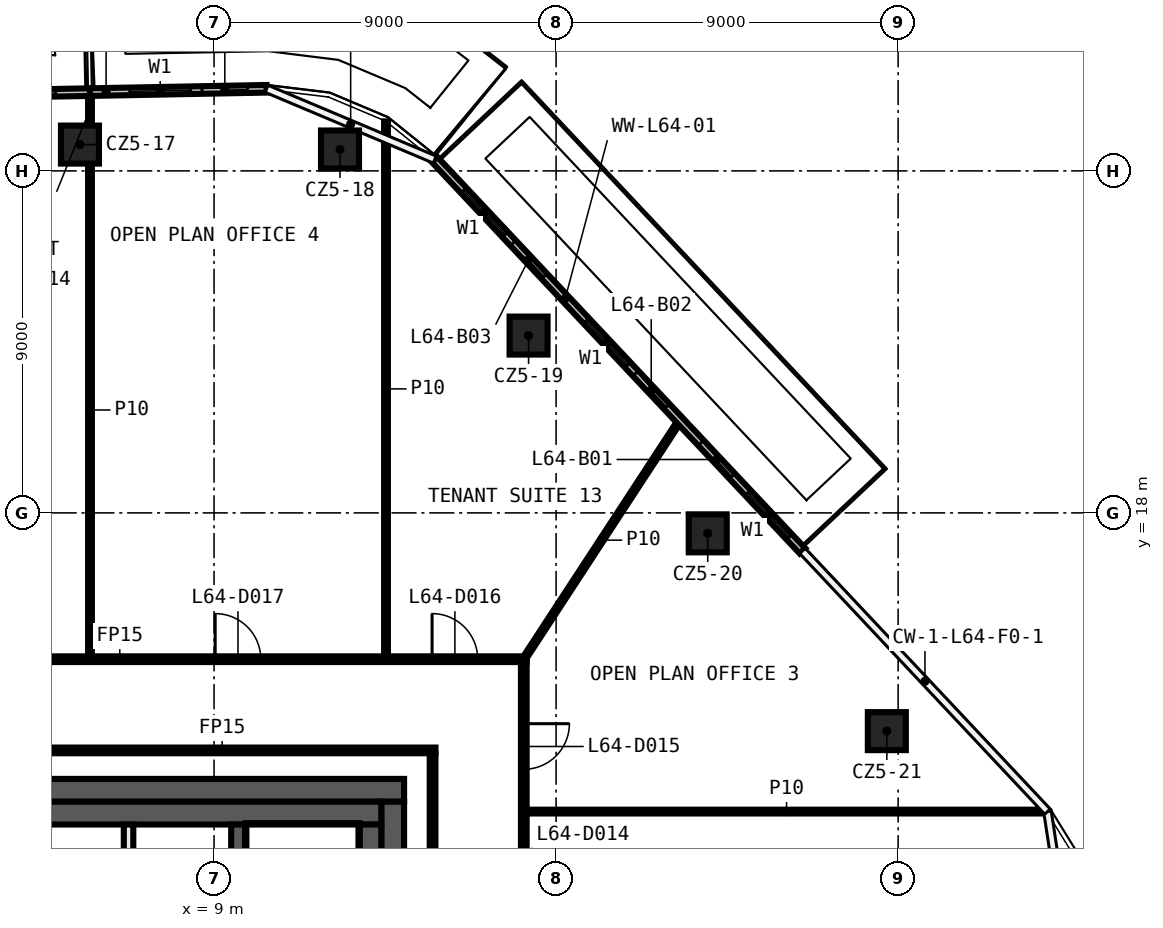
"""IFC4 building model, lengths in metres.
Left out: names, types, materials, properties, quantities, classifications, styles, units other than length and angle.
Written with IfcOpenShell. Run it as: python <this file> out.ifc"""

import sys

from ifc_helpers import new_model, si_unit, direction, frame, frame_2d, origin, origin_2d, place, context, subcontext, project, spatial, rectangle, extrude, element, fill, save


model = new_model("IFC4")
c1 = context("Model", 3, precision=1e-05, world=origin(), true_north=direction((0.0, 1.0)))
c2 = subcontext(c1, "Body", "Model", "MODEL_VIEW")
j1 = project(units=[si_unit("LENGTHUNIT", "METRE"), si_unit("PLANEANGLEUNIT", "RADIAN")], contexts=[c1])
p1 = place(None, origin())
s1 = spatial("IfcSite", under=j1, at=p1, CompositionType="ELEMENT")
p2 = place(p1, origin())
s2 = spatial("IfcBuilding", under=s1, at=p2, CompositionType="ELEMENT")
p3 = place(p2, frame((0.0, 0.0, 302.6)))
s3 = spatial("IfcBuildingStorey", under=s2, at=p3, CompositionType="ELEMENT", Elevation=302.6)
for number, where, z_axis, x_axis in (
    (1, (5.471, 27.692, 0.0), (0.0, 0.0, 1.0), (1.0, 0.0, 0.0)),
    (2, (12.314, 27.563, 0.0), (0.0, 0.0, 1.0), (1.0, 0.0, 0.0)),
    (3, (17.276, 22.666, 0.0), (0.0, 0.0, 1.0), (1.0, 0.0, 0.0)),
    (4, (21.99, 17.462, 0.0), (0.0, 0.0, 1.0), (1.0, 0.0, 0.0)),
    (5, (26.703, 12.257, 0.0), (0.0, 0.0, 1.0), (1.0, 0.0, 0.0)),
):
    element("IfcColumn", number, at=place(p3, frame(where, z_axis=z_axis, x_axis=x_axis)), inside=s3, PredefinedType="COLUMN", context=c2, shape_type="SweptSolid", body=[
        extrude(rectangle(XDim=1.0, YDim=1.0, at=origin_2d()), origin(), (0.0, 0.0, 1.0), 3.82),
    ])
p4 = place(p3, frame((17.225, 10.14, 0.0), z_axis=(0.0, 0.0, 1.0), x_axis=(1.0, 0.0, 0.0)))
e6 = element("IfcWall", 6, at=p4, inside=s3, PredefinedType="PARTITIONING", context=c2, shape_type="SweptSolid", body=[
    extrude(rectangle(XDim=13.677, YDim=0.1, at=frame_2d((6.839, 0.0))), origin(), (0.0, 0.0, 1.0), 3.82),
])
p5 = place(p3, frame((3.6, 11.75, 0.0), z_axis=(0.0, 0.0, 1.0), x_axis=(1.0, 0.0, 0.0)))
e7 = element("IfcWall", 7, at=p5, inside=s3, PredefinedType="PARTITIONING", context=c2, shape_type="SweptSolid", body=[
    extrude(rectangle(XDim=11.225, YDim=0.15, at=frame_2d((5.612, 0.0))), origin(), (0.0, 0.0, 1.0), 3.82),
])
p6 = place(p3, frame((-17.225, 14.15, 0.0), z_axis=(0.0, 0.0, 1.0), x_axis=(1.0, 0.0, 0.0)))
e8 = element("IfcWall", 8, at=p6, inside=s3, PredefinedType="PARTITIONING", context=c2, shape_type="SweptSolid", body=[
    extrude(rectangle(XDim=34.45, YDim=0.15, at=frame_2d((17.225, 0.0))), origin(), (0.0, 0.0, 1.0), 3.82),
])
p7 = place(p6, frame((31.962, 0.0, 0.0)))
e9 = element("IfcOpeningElement", 9, at=p7, cuts=e8, PredefinedType="OPENING", context=c2, shape_type="SweptSolid", body=[
    extrude(rectangle(XDim=1.2, YDim=2.1, at=frame_2d((0.6, 1.05))), frame((0.0, 0.085, 0.0), z_axis=(0.0, -1.0, 0.0), x_axis=(1.0, 0.0, 0.0)), (0.0, 0.0, 1.0), 0.17),
])
p8 = place(p6, frame((26.254, 0.0, 0.0)))
e10 = element("IfcOpeningElement", 10, at=p8, cuts=e8, PredefinedType="OPENING", context=c2, shape_type="SweptSolid", body=[
    extrude(rectangle(XDim=1.2, YDim=2.1, at=frame_2d((0.6, 1.05))), frame((0.0, 0.085, 0.0), z_axis=(0.0, -1.0, 0.0), x_axis=(1.0, 0.0, 0.0)), (0.0, 0.0, 1.0), 0.17),
])
p9 = place(p6, frame((20.032, 0.0, 0.0)))
e11 = element("IfcOpeningElement", 11, at=p9, cuts=e8, PredefinedType="OPENING", context=c2, shape_type="SweptSolid", body=[
    extrude(rectangle(XDim=1.2, YDim=2.1, at=frame_2d((0.6, 1.05))), frame((0.0, 0.085, 0.0), z_axis=(0.0, -1.0, 0.0), x_axis=(1.0, 0.0, 0.0)), (0.0, 0.0, 1.0), 0.17),
])
p10 = place(p6, frame((15.378, 0.0, 0.0)))
e12 = element("IfcOpeningElement", 12, at=p10, cuts=e8, PredefinedType="OPENING", context=c2, shape_type="SweptSolid", body=[
    extrude(rectangle(XDim=1.2, YDim=2.1, at=frame_2d((0.6, 1.05))), frame((0.0, 0.085, 0.0), z_axis=(0.0, -1.0, 0.0), x_axis=(1.0, 0.0, 0.0)), (0.0, 0.0, 1.0), 0.17),
])
p11 = place(p6, frame((10.723, 0.0, 0.0)))
e13 = element("IfcOpeningElement", 13, at=p11, cuts=e8, PredefinedType="OPENING", context=c2, shape_type="SweptSolid", body=[
    extrude(rectangle(XDim=1.2, YDim=2.1, at=frame_2d((0.6, 1.05))), frame((0.0, 0.085, 0.0), z_axis=(0.0, -1.0, 0.0), x_axis=(1.0, 0.0, 0.0)), (0.0, 0.0, 1.0), 0.17),
])
p12 = place(p6, frame((6.073, 0.0, 0.0)))
e14 = element("IfcOpeningElement", 14, at=p12, cuts=e8, PredefinedType="OPENING", context=c2, shape_type="SweptSolid", body=[
    extrude(rectangle(XDim=1.2, YDim=2.1, at=frame_2d((0.6, 1.05))), frame((0.0, 0.085, 0.0), z_axis=(0.0, -1.0, 0.0), x_axis=(1.0, 0.0, 0.0)), (0.0, 0.0, 1.0), 0.17),
])
p13 = place(p6, frame((1.774, 0.0, 0.0)))
e15 = element("IfcOpeningElement", 15, at=p13, cuts=e8, PredefinedType="OPENING", context=c2, shape_type="SweptSolid", body=[
    extrude(rectangle(XDim=1.2, YDim=2.1, at=frame_2d((0.6, 1.05))), frame((0.0, 0.085, 0.0), z_axis=(0.0, -1.0, 0.0), x_axis=(1.0, 0.0, 0.0)), (0.0, 0.0, 1.0), 0.17),
])
p14 = place(p3, frame((17.15, 14.15, 0.0), z_axis=(0.0, 0.0, 1.0), x_axis=(0.547120172247, 0.837054070608, 0.0)))
e16 = element("IfcWall", 16, at=p14, inside=s3, PredefinedType="PARTITIONING", context=c2, shape_type="SweptSolid", body=[
    extrude(rectangle(XDim=7.485, YDim=0.1, at=frame_2d((3.743, 0.0))), origin(), (0.0, 0.0, 1.0), 3.82),
])
p15 = place(p3, frame((17.15, 14.075, 0.0), z_axis=(0.0, 0.0, 1.0), x_axis=(0.0, -1.0, 0.0)))
e17 = element("IfcWall", 17, at=p15, inside=s3, PredefinedType="PARTITIONING", context=c2, shape_type="SweptSolid", body=[
    extrude(rectangle(XDim=28.15, YDim=0.15, at=frame_2d((14.075, 0.0))), origin(), (0.0, 0.0, 1.0), 3.82),
])
p16 = place(p15, frame((24.326, 0.0, 0.0)))
e18 = element("IfcOpeningElement", 18, at=p16, cuts=e17, PredefinedType="OPENING", context=c2, shape_type="SweptSolid", body=[
    extrude(rectangle(XDim=1.2, YDim=2.1, at=frame_2d((0.6, 1.05))), frame((0.0, 0.085, 0.0), z_axis=(0.0, -1.0, 0.0), x_axis=(1.0, 0.0, 0.0)), (0.0, 0.0, 1.0), 0.17),
])
p17 = place(p15, frame((20.22, 0.0, 0.0)))
e19 = element("IfcOpeningElement", 19, at=p17, cuts=e17, PredefinedType="OPENING", context=c2, shape_type="SweptSolid", body=[
    extrude(rectangle(XDim=1.2, YDim=2.1, at=frame_2d((0.6, 1.05))), frame((0.0, 0.085, 0.0), z_axis=(0.0, -1.0, 0.0), x_axis=(1.0, 0.0, 0.0)), (0.0, 0.0, 1.0), 0.17),
])
p18 = place(p15, frame((16.114, 0.0, 0.0)))
e20 = element("IfcOpeningElement", 20, at=p18, cuts=e17, PredefinedType="OPENING", context=c2, shape_type="SweptSolid", body=[
    extrude(rectangle(XDim=1.2, YDim=2.1, at=frame_2d((0.6, 1.05))), frame((0.0, 0.085, 0.0), z_axis=(0.0, -1.0, 0.0), x_axis=(1.0, 0.0, 0.0)), (0.0, 0.0, 1.0), 0.17),
])
p19 = place(p15, frame((12.012, 0.0, 0.0)))
e21 = element("IfcOpeningElement", 21, at=p19, cuts=e17, PredefinedType="OPENING", context=c2, shape_type="SweptSolid", body=[
    extrude(rectangle(XDim=1.2, YDim=2.1, at=frame_2d((0.6, 1.05))), frame((0.0, 0.085, 0.0), z_axis=(0.0, -1.0, 0.0), x_axis=(1.0, 0.0, 0.0)), (0.0, 0.0, 1.0), 0.17),
])
p20 = place(p15, frame((5.504, 0.0, 0.0)))
e22 = element("IfcOpeningElement", 22, at=p20, cuts=e17, PredefinedType="OPENING", context=c2, shape_type="SweptSolid", body=[
    extrude(rectangle(XDim=1.2, YDim=2.1, at=frame_2d((0.6, 1.05))), frame((0.0, 0.085, 0.0), z_axis=(0.0, -1.0, 0.0), x_axis=(1.0, 0.0, 0.0)), (0.0, 0.0, 1.0), 0.17),
])
p21 = place(p15, frame((1.622, 0.0, 0.0)))
e23 = element("IfcOpeningElement", 23, at=p21, cuts=e17, PredefinedType="OPENING", context=c2, shape_type="SweptSolid", body=[
    extrude(rectangle(XDim=1.2, YDim=2.1, at=frame_2d((0.6, 1.05))), frame((0.0, 0.085, 0.0), z_axis=(0.0, -1.0, 0.0), x_axis=(1.0, 0.0, 0.0)), (0.0, 0.0, 1.0), 0.17),
])
p22 = place(p3, frame((14.75, -11.675, 0.0), z_axis=(0.0, 0.0, 1.0), x_axis=(0.0, 1.0, 0.0)))
e24 = element("IfcWall", 24, at=p22, inside=s3, PredefinedType="PARTITIONING", context=c2, shape_type="SweptSolid", body=[
    extrude(rectangle(XDim=23.35, YDim=0.15, at=frame_2d((11.675, 0.0))), origin(), (0.0, 0.0, 1.0), 3.82),
])
p23 = place(p3, frame((13.524, 14.225, 0.0), z_axis=(0.0, 0.0, 1.0), x_axis=(0.0, 1.0, 0.0)))
e25 = element("IfcWall", 25, at=p23, inside=s3, PredefinedType="PARTITIONING", context=c2, shape_type="SweptSolid", body=[
    extrude(rectangle(XDim=14.077, YDim=0.1, at=frame_2d((7.039, 0.0))), origin(), (0.0, 0.0, 1.0), 3.82),
])
p24 = place(p3, frame((5.735, 14.225, 0.0), z_axis=(0.0, 0.0, 1.0), x_axis=(0.0, 1.0, 0.0)))
e26 = element("IfcWall", 26, at=p24, inside=s3, PredefinedType="PARTITIONING", context=c2, shape_type="SweptSolid", body=[
    extrude(rectangle(XDim=12.967, YDim=0.1, at=frame_2d((6.483, 0.0))), origin(), (0.0, 0.0, 1.0), 3.82),
])
p25 = place(p3, frame((5.735, 28.192, 0.0), z_axis=(0.0, 0.0, 1.0), x_axis=(0.0, 1.0, 0.0)))
e27 = element("IfcWall", 27, at=p25, inside=s3, PredefinedType="PARTITIONING", context=c2, shape_type="SweptSolid", body=[
    extrude(rectangle(XDim=0.861, YDim=0.1, at=frame_2d((0.43, 0.0))), origin(), (0.0, 0.0, 1.0), 3.82),
])
p26 = place(p3, frame((24.482, 17.0, 0.0), z_axis=(0.0, 0.0, 1.0), x_axis=(-0.684823965592, 0.728708539919, 0.0)))
e28 = element("IfcWall", 28, at=p26, inside=s3, PredefinedType="SOLIDWALL", context=c2, shape_type="SweptSolid", body=[
    extrude(rectangle(XDim=14.131, YDim=0.2, at=frame_2d((7.065, 0.0))), origin(), (0.0, 0.0, 1.0), 3.82),
])
p27 = place(p26, frame((0.5, 0.0, 0.6)))
e29 = element("IfcOpeningElement", 29, at=p27, cuts=e28, PredefinedType="OPENING", context=c2, shape_type="SweptSolid", body=[
    extrude(rectangle(XDim=1.6, YDim=2.4, at=frame_2d((0.8, 1.2))), frame((0.0, 0.11, 0.0), z_axis=(0.0, -1.0, 0.0), x_axis=(1.0, 0.0, 0.0)), (0.0, 0.0, 1.0), 0.22),
])
p28 = place(p26, frame((2.7, 0.0, 0.0)))
e30 = element("IfcOpeningElement", 30, at=p28, cuts=e28, PredefinedType="OPENING", context=c2, shape_type="SweptSolid", body=[
    extrude(rectangle(XDim=1.2, YDim=2.4, at=frame_2d((0.6, 1.2))), frame((0.0, 0.11, 0.0), z_axis=(0.0, -1.0, 0.0), x_axis=(1.0, 0.0, 0.0)), (0.0, 0.0, 1.0), 0.22),
])
p29 = place(p26, frame((6.71, 0.0, 0.6)))
e31 = element("IfcOpeningElement", 31, at=p29, cuts=e28, PredefinedType="OPENING", context=c2, shape_type="SweptSolid", body=[
    extrude(rectangle(XDim=1.6, YDim=2.4, at=frame_2d((0.8, 1.2))), frame((0.0, 0.11, 0.0), z_axis=(0.0, -1.0, 0.0), x_axis=(1.0, 0.0, 0.0)), (0.0, 0.0, 1.0), 0.22),
])
p30 = place(p26, frame((5.21, 0.0, 0.0)))
e32 = element("IfcOpeningElement", 32, at=p30, cuts=e28, PredefinedType="OPENING", context=c2, shape_type="SweptSolid", body=[
    extrude(rectangle(XDim=1.2, YDim=2.4, at=frame_2d((0.6, 1.2))), frame((0.0, 0.11, 0.0), z_axis=(0.0, -1.0, 0.0), x_axis=(1.0, 0.0, 0.0)), (0.0, 0.0, 1.0), 0.22),
])
p31 = place(p26, frame((11.42, 0.0, 0.6)))
e33 = element("IfcOpeningElement", 33, at=p31, cuts=e28, PredefinedType="OPENING", context=c2, shape_type="SweptSolid", body=[
    extrude(rectangle(XDim=1.6, YDim=2.4, at=frame_2d((0.8, 1.2))), frame((0.0, 0.11, 0.0), z_axis=(0.0, -1.0, 0.0), x_axis=(1.0, 0.0, 0.0)), (0.0, 0.0, 1.0), 0.22),
])
p32 = place(p26, frame((9.92, 0.0, 0.0)))
e34 = element("IfcOpeningElement", 34, at=p32, cuts=e28, PredefinedType="OPENING", context=c2, shape_type="SweptSolid", body=[
    extrude(rectangle(XDim=1.2, YDim=2.4, at=frame_2d((0.6, 1.2))), frame((0.0, 0.11, 0.0), z_axis=(0.0, -1.0, 0.0), x_axis=(1.0, 0.0, 0.0)), (0.0, 0.0, 1.0), 0.22),
])
p33 = place(p3, frame((5.735, 29.073, 0.0), z_axis=(0.0, 0.0, 1.0), x_axis=(-0.999821300983, -0.01890412918, 0.0)))
e35 = element("IfcWall", 35, at=p33, inside=s3, PredefinedType="SOLIDWALL", context=c2, shape_type="SweptSolid", body=[
    extrude(rectangle(XDim=9.312, YDim=0.2, at=frame_2d((4.656, 0.0))), origin(), (0.0, 0.0, 1.0), 3.82),
])
p34 = place(p33, frame((2.4, 0.0, 0.6)))
e36 = element("IfcOpeningElement", 36, at=p34, cuts=e35, PredefinedType="OPENING", context=c2, shape_type="SweptSolid", body=[
    extrude(rectangle(XDim=1.6, YDim=2.4, at=frame_2d((0.8, 1.2))), frame((0.0, 0.11, 0.0), z_axis=(0.0, -1.0, 0.0), x_axis=(1.0, 0.0, 0.0)), (0.0, 0.0, 1.0), 0.22),
])
p35 = place(p33, frame((0.9, 0.0, 0.0)))
e37 = element("IfcOpeningElement", 37, at=p35, cuts=e35, PredefinedType="OPENING", context=c2, shape_type="SweptSolid", body=[
    extrude(rectangle(XDim=1.2, YDim=2.4, at=frame_2d((0.6, 1.2))), frame((0.0, 0.11, 0.0), z_axis=(0.0, -1.0, 0.0), x_axis=(1.0, 0.0, 0.0)), (0.0, 0.0, 1.0), 0.22),
])
p36 = place(p33, frame((6.656, 0.0, 0.6)))
e38 = element("IfcOpeningElement", 38, at=p36, cuts=e35, PredefinedType="OPENING", context=c2, shape_type="SweptSolid", body=[
    extrude(rectangle(XDim=1.6, YDim=2.4, at=frame_2d((0.8, 1.2))), frame((0.0, 0.11, 0.0), z_axis=(0.0, -1.0, 0.0), x_axis=(1.0, 0.0, 0.0)), (0.0, 0.0, 1.0), 0.22),
])
p37 = place(p33, frame((5.156, 0.0, 0.0)))
e39 = element("IfcOpeningElement", 39, at=p37, cuts=e35, PredefinedType="OPENING", context=c2, shape_type="SweptSolid", body=[
    extrude(rectangle(XDim=1.2, YDim=2.4, at=frame_2d((0.6, 1.2))), frame((0.0, 0.11, 0.0), z_axis=(0.0, -1.0, 0.0), x_axis=(1.0, 0.0, 0.0)), (0.0, 0.0, 1.0), 0.22),
])
p38 = place(p3, frame((10.383, 29.161, 0.0), z_axis=(0.0, 0.0, 1.0), x_axis=(-0.999821262404, -0.018906169475, 0.0)))
e40 = element("IfcWall", 40, at=p38, inside=s3, PredefinedType="SOLIDWALL", context=c2, shape_type="SweptSolid", body=[
    extrude(rectangle(XDim=4.649, YDim=0.2, at=frame_2d((2.324, 0.0))), origin(), (0.0, 0.0, 1.0), 3.82),
])
p39 = place(p38, frame((2.0, 0.0, 0.6)))
e41 = element("IfcOpeningElement", 41, at=p39, cuts=e40, PredefinedType="OPENING", context=c2, shape_type="SweptSolid", body=[
    extrude(rectangle(XDim=1.6, YDim=2.4, at=frame_2d((0.8, 1.2))), frame((0.0, 0.11, 0.0), z_axis=(0.0, -1.0, 0.0), x_axis=(1.0, 0.0, 0.0)), (0.0, 0.0, 1.0), 0.22),
])
p40 = place(p38, frame((0.5, 0.0, 0.0)))
e42 = element("IfcOpeningElement", 42, at=p40, cuts=e40, PredefinedType="OPENING", context=c2, shape_type="SweptSolid", body=[
    extrude(rectangle(XDim=1.2, YDim=2.4, at=frame_2d((0.6, 1.2))), frame((0.0, 0.11, 0.0), z_axis=(0.0, -1.0, 0.0), x_axis=(1.0, 0.0, 0.0)), (0.0, 0.0, 1.0), 0.22),
])
p41 = place(p3, frame((-14.0, 10.7, 0.0), z_axis=(0.0, 0.0, 1.0), x_axis=(1.0, 0.0, 0.0)))
e43 = element("IfcWall", 43, at=p41, inside=s3, PredefinedType="SHEAR", context=c2, shape_type="SweptSolid", body=[
    extrude(rectangle(XDim=28.0, YDim=0.6, at=frame_2d((14.0, 0.0))), origin(), (0.0, 0.0, 1.0), 3.82),
])
p42 = place(p41, frame((15.9, 0.0, 0.0)))
e44 = element("IfcOpeningElement", 44, at=p42, cuts=e43, PredefinedType="OPENING", context=c2, shape_type="SweptSolid", body=[
    extrude(rectangle(XDim=1.6, YDim=2.1, at=frame_2d((0.8, 1.05))), frame((0.0, 0.31, 0.0), z_axis=(0.0, -1.0, 0.0), x_axis=(1.0, 0.0, 0.0)), (0.0, 0.0, 1.0), 0.62),
])
p43 = place(p3, frame((13.7, 10.4, 0.0), z_axis=(0.0, 0.0, 1.0), x_axis=(0.0, -1.0, 0.0)))
e45 = element("IfcWall", 45, at=p43, inside=s3, PredefinedType="SHEAR", context=c2, shape_type="SweptSolid", body=[
    extrude(rectangle(XDim=20.8, YDim=0.6, at=frame_2d((10.4, 0.0))), origin(), (0.0, 0.0, 1.0), 3.82),
])
p44 = place(p3, frame((3.9, 10.1, 0.0), z_axis=(0.0, 0.0, 1.0), x_axis=(1.0, 0.0, 0.0)))
e46 = element("IfcWall", 46, at=p44, inside=s3, PredefinedType="SHEAR", context=c2, shape_type="SweptSolid", body=[
    extrude(rectangle(XDim=9.5, YDim=0.6, at=frame_2d((4.75, 0.0))), origin(), (0.0, 0.0, 1.0), 3.82),
])
p45 = place(p3, frame((13.1, 9.8, 0.0), z_axis=(0.0, 0.0, 1.0), x_axis=(0.0, -1.0, 0.0)))
e47 = element("IfcWall", 47, at=p45, inside=s3, PredefinedType="SHEAR", context=c2, shape_type="SweptSolid", body=[
    extrude(rectangle(XDim=19.6, YDim=0.6, at=frame_2d((9.8, 0.0))), origin(), (0.0, 0.0, 1.0), 3.82),
])
p46 = place(p3, frame((9.65, 9.8, 0.0), z_axis=(0.0, 0.0, 1.0), x_axis=(0.0, -1.0, 0.0)))
e48 = element("IfcWall", 48, at=p46, inside=s3, PredefinedType="SHEAR", context=c2, shape_type="SweptSolid", body=[
    extrude(rectangle(XDim=7.5, YDim=0.4, at=frame_2d((3.75, 0.0))), origin(), (0.0, 0.0, 1.0), 3.82),
])
p47 = place(p46, frame((5.1, 0.0, 0.0)))
e49 = element("IfcOpeningElement", 49, at=p47, cuts=e48, PredefinedType="OPENING", context=c2, shape_type="SweptSolid", body=[
    extrude(rectangle(XDim=1.2, YDim=2.1, at=frame_2d((0.6, 1.05))), frame((0.0, 0.21, 0.0), z_axis=(0.0, -1.0, 0.0), x_axis=(1.0, 0.0, 0.0)), (0.0, 0.0, 1.0), 0.42),
])
p48 = place(p3, frame((6.75, 7.075, 0.0), z_axis=(0.0, 0.0, 1.0), x_axis=(0.0, 1.0, 0.0)))
e50 = element("IfcWall", 50, at=p48, inside=s3, PredefinedType="SOLIDWALL", context=c2, shape_type="SweptSolid", body=[
    extrude(rectangle(XDim=2.725, YDim=0.25, at=frame_2d((1.363, 0.0))), origin(), (0.0, 0.0, 1.0), 3.82),
])
p49 = place(p21, origin())
e51 = element("IfcDoor", 51, at=p49, inside=s3, OperationType="SINGLE_SWING_RIGHT", PredefinedType="DOOR", context=c2, shape_type="SweptSolid", body=[
    extrude(rectangle(XDim=1.2, YDim=2.1, at=frame_2d((0.6, 1.05))), frame((0.0, 0.025, 0.0), z_axis=(0.0, -1.0, 0.0), x_axis=(1.0, 0.0, 0.0)), (0.0, 0.0, 1.0), 0.05),
])
fill(e23, e51)
p50 = place(p7, origin())
e52 = element("IfcDoor", 52, at=p50, inside=s3, OperationType="SINGLE_SWING_LEFT", PredefinedType="DOOR", context=c2, shape_type="SweptSolid", body=[
    extrude(rectangle(XDim=1.2, YDim=2.1, at=frame_2d((0.6, 1.05))), frame((0.0, 0.025, 0.0), z_axis=(0.0, -1.0, 0.0), x_axis=(1.0, 0.0, 0.0)), (0.0, 0.0, 1.0), 0.05),
])
fill(e9, e52)
p51 = place(p8, origin())
e53 = element("IfcDoor", 53, at=p51, inside=s3, OperationType="SINGLE_SWING_RIGHT", PredefinedType="DOOR", context=c2, shape_type="SweptSolid", body=[
    extrude(rectangle(XDim=1.2, YDim=2.1, at=frame_2d((0.6, 1.05))), frame((0.0, 0.025, 0.0), z_axis=(0.0, -1.0, 0.0), x_axis=(1.0, 0.0, 0.0)), (0.0, 0.0, 1.0), 0.05),
])
fill(e10, e53)
p52 = place(p27, origin())
e54 = element("IfcWindow", 54, at=p52, inside=s3, PartitioningType="SINGLE_PANEL", PredefinedType="WINDOW", context=c2, shape_type="SweptSolid", body=[
    extrude(rectangle(XDim=1.6, YDim=2.4, at=frame_2d((0.8, 1.2))), frame((0.0, 0.03, 0.0), z_axis=(0.0, -1.0, 0.0), x_axis=(1.0, 0.0, 0.0)), (0.0, 0.0, 1.0), 0.06),
])
fill(e29, e54)
p53 = place(p28, origin())
e55 = element("IfcDoor", 55, at=p53, inside=s3, OperationType="SLIDING_TO_LEFT", PredefinedType="DOOR", context=c2, shape_type="SweptSolid", body=[
    extrude(rectangle(XDim=1.2, YDim=2.4, at=frame_2d((0.6, 1.2))), frame((0.0, 0.025, 0.0), z_axis=(0.0, -1.0, 0.0), x_axis=(1.0, 0.0, 0.0)), (0.0, 0.0, 1.0), 0.05),
])
fill(e30, e55)
p54 = place(p29, origin())
e56 = element("IfcWindow", 56, at=p54, inside=s3, PartitioningType="SINGLE_PANEL", PredefinedType="WINDOW", context=c2, shape_type="SweptSolid", body=[
    extrude(rectangle(XDim=1.6, YDim=2.4, at=frame_2d((0.8, 1.2))), frame((0.0, 0.03, 0.0), z_axis=(0.0, -1.0, 0.0), x_axis=(1.0, 0.0, 0.0)), (0.0, 0.0, 1.0), 0.06),
])
fill(e31, e56)
p55 = place(p30, origin())
e57 = element("IfcDoor", 57, at=p55, inside=s3, OperationType="SLIDING_TO_LEFT", PredefinedType="DOOR", context=c2, shape_type="SweptSolid", body=[
    extrude(rectangle(XDim=1.2, YDim=2.4, at=frame_2d((0.6, 1.2))), frame((0.0, 0.025, 0.0), z_axis=(0.0, -1.0, 0.0), x_axis=(1.0, 0.0, 0.0)), (0.0, 0.0, 1.0), 0.05),
])
fill(e32, e57)
p56 = place(p31, origin())
e58 = element("IfcWindow", 58, at=p56, inside=s3, PartitioningType="SINGLE_PANEL", PredefinedType="WINDOW", context=c2, shape_type="SweptSolid", body=[
    extrude(rectangle(XDim=1.6, YDim=2.4, at=frame_2d((0.8, 1.2))), frame((0.0, 0.03, 0.0), z_axis=(0.0, -1.0, 0.0), x_axis=(1.0, 0.0, 0.0)), (0.0, 0.0, 1.0), 0.06),
])
fill(e33, e58)
p57 = place(p32, origin())
e59 = element("IfcDoor", 59, at=p57, inside=s3, OperationType="SLIDING_TO_LEFT", PredefinedType="DOOR", context=c2, shape_type="SweptSolid", body=[
    extrude(rectangle(XDim=1.2, YDim=2.4, at=frame_2d((0.6, 1.2))), frame((0.0, 0.025, 0.0), z_axis=(0.0, -1.0, 0.0), x_axis=(1.0, 0.0, 0.0)), (0.0, 0.0, 1.0), 0.05),
])
fill(e34, e59)
p58 = place(p35, origin())
e60 = element("IfcDoor", 60, at=p58, inside=s3, OperationType="SLIDING_TO_LEFT", PredefinedType="DOOR", context=c2, shape_type="SweptSolid", body=[
    extrude(rectangle(XDim=1.2, YDim=2.4, at=frame_2d((0.6, 1.2))), frame((0.0, 0.025, 0.0), z_axis=(0.0, -1.0, 0.0), x_axis=(1.0, 0.0, 0.0)), (0.0, 0.0, 1.0), 0.05),
])
fill(e37, e60)
p59 = place(p39, origin())
e61 = element("IfcWindow", 61, at=p59, inside=s3, PartitioningType="SINGLE_PANEL", PredefinedType="WINDOW", context=c2, shape_type="SweptSolid", body=[
    extrude(rectangle(XDim=1.6, YDim=2.4, at=frame_2d((0.8, 1.2))), frame((0.0, 0.03, 0.0), z_axis=(0.0, -1.0, 0.0), x_axis=(1.0, 0.0, 0.0)), (0.0, 0.0, 1.0), 0.06),
])
fill(e41, e61)
p60 = place(p40, origin())
e62 = element("IfcDoor", 62, at=p60, inside=s3, OperationType="SLIDING_TO_LEFT", PredefinedType="DOOR", context=c2, shape_type="SweptSolid", body=[
    extrude(rectangle(XDim=1.2, YDim=2.4, at=frame_2d((0.6, 1.2))), frame((0.0, 0.025, 0.0), z_axis=(0.0, -1.0, 0.0), x_axis=(1.0, 0.0, 0.0)), (0.0, 0.0, 1.0), 0.05),
])
fill(e42, e62)
save(model, sys.argv[1])
